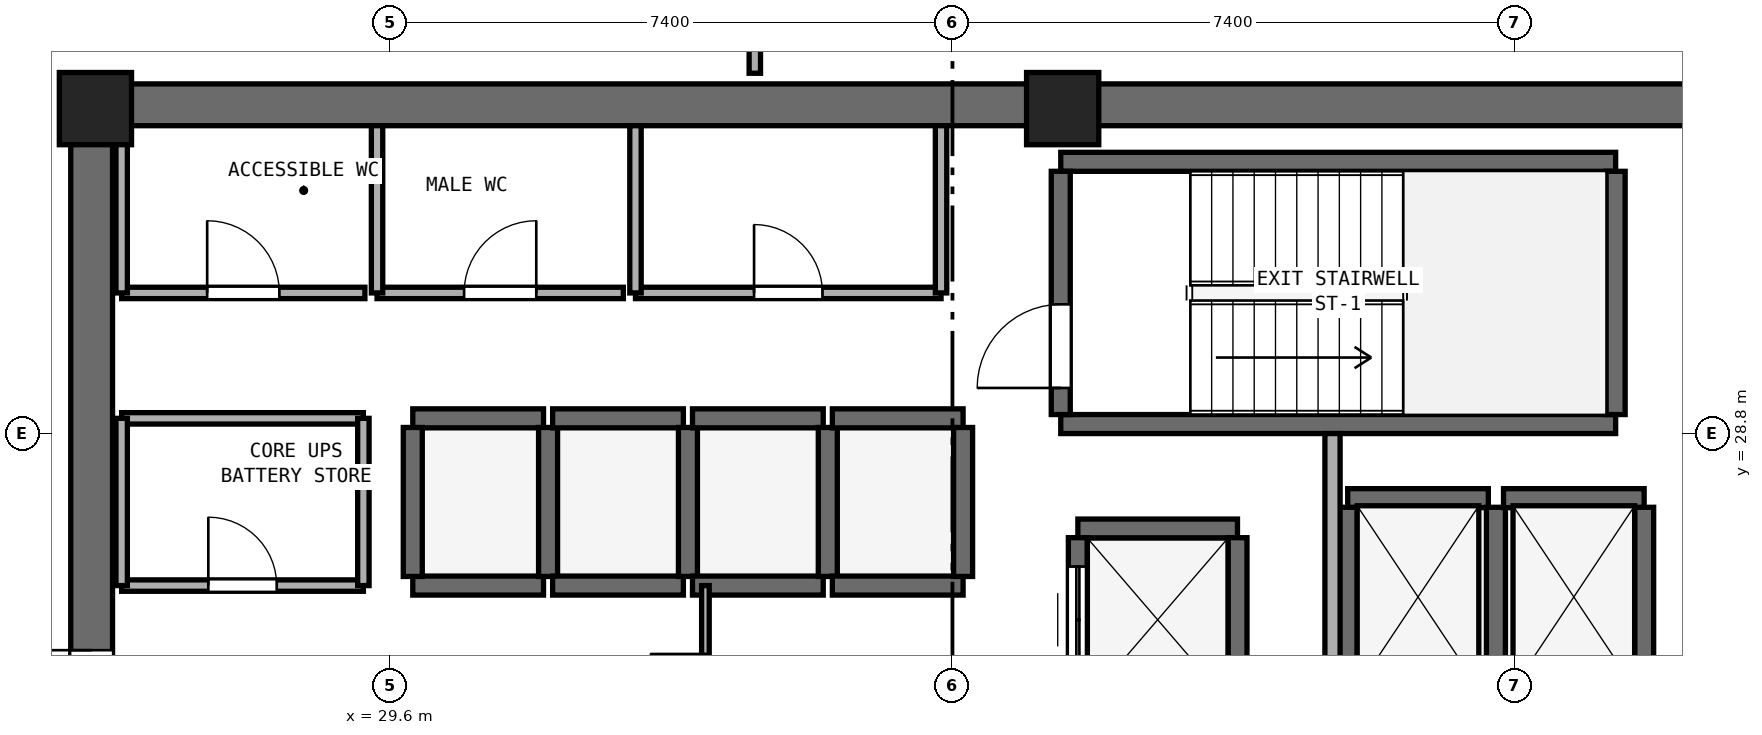
"""IFC4 building model, lengths in metres.
Left out: names, types, materials, properties, quantities, classifications, styles, units other than length and angle.
Written with IfcOpenShell. Run it as: python <this file> out.ifc"""

import sys

from ifc_helpers import new_model, si_unit, direction, frame, frame_2d, origin, origin_2d, place, context, subcontext, project, spatial, rectangle, extrude, element, fill, save


model = new_model("IFC4")
c1 = context("Model", 3, precision=1e-05, world=origin(), true_north=direction((0.0, 1.0)))
c2 = subcontext(c1, "Body", "Model", "MODEL_VIEW")
j1 = project(units=[si_unit("LENGTHUNIT", "METRE"), si_unit("PLANEANGLEUNIT", "RADIAN")], contexts=[c1])
p1 = place(None, origin())
s1 = spatial("IfcSite", under=j1, at=p1, CompositionType="ELEMENT")
p2 = place(p1, origin())
s2 = spatial("IfcBuilding", under=s1, at=p2, CompositionType="ELEMENT")
p3 = place(p2, frame((0.0, 0.0, 197.2)))
s3 = spatial("IfcBuildingStorey", under=s2, at=p3, CompositionType="ELEMENT", Elevation=197.2)
p4 = place(p3, frame((25.4, 33.125, 0.0), z_axis=(0.0, 0.0, 1.0), x_axis=(1.0, 0.0, 0.0)))
e1 = element("IfcWall", 1, at=p4, inside=s3, PredefinedType="SHEAR", context=c2, shape_type="SweptSolid", body=[
    extrude(rectangle(XDim=23.2, YDim=0.55, at=frame_2d((11.6, 0.0))), origin(), (0.0, 0.0, 1.0), 3.54),
])
p5 = place(p3, frame((25.675, 17.55, 0.0), z_axis=(0.0, 0.0, 1.0), x_axis=(0.0, 1.0, 0.0)))
e2 = element("IfcWall", 2, at=p5, inside=s3, PredefinedType="SHEAR", context=c2, shape_type="SweptSolid", body=[
    extrude(rectangle(XDim=15.3, YDim=0.55, at=frame_2d((7.65, 0.0))), origin(), (0.0, 0.0, 1.0), 3.54),
])
p6 = place(p5, frame((6.9, 0.0, 0.0)))
e3 = element("IfcOpeningElement", 3, at=p6, cuts=e2, PredefinedType="OPENING", context=c2, shape_type="SweptSolid", body=[
    extrude(rectangle(XDim=1.5, YDim=2.15, at=frame_2d((0.75, 1.075))), frame((0.0, 0.285, 0.0), z_axis=(0.0, -1.0, 0.0), x_axis=(1.0, 0.0, 0.0)), (0.0, 0.0, 1.0), 0.57),
])
for number, where, z_axis, x_axis in (
    (4, (38.45, 33.075, 0.0), (0.0, 0.0, 1.0), (1.0, 0.0, 0.0)),
    (5, (25.725, 33.075, 0.0), (0.0, 0.0, 1.0), (1.0, 0.0, 0.0)),
):
    element("IfcColumn", number, at=place(p3, frame(where, z_axis=z_axis, x_axis=x_axis)), inside=s3, PredefinedType="PILASTER", context=c2, shape_type="SweptSolid", body=[
        extrude(rectangle(XDim=0.95, YDim=0.95, at=origin_2d()), origin(), (0.0, 0.0, 1.0), 3.8),
    ])
for number, where, z_axis, x_axis in (
    (6, (38.425, 28.925, 0.0), (0.0, 0.0, 1.0), (1.0, 0.0, 0.0)),
    (7, (38.425, 32.375, 0.0), (0.0, 0.0, 1.0), (1.0, 0.0, 0.0)),
):
    element("IfcWall", number, at=place(p3, frame(where, z_axis=z_axis, x_axis=x_axis)), inside=s3, PredefinedType="SHEAR", context=c2, shape_type="SweptSolid", body=[
        extrude(rectangle(XDim=7.3, YDim=0.25, at=frame_2d((3.65, 0.0))), origin(), (0.0, 0.0, 1.0), 3.54),
    ])
p7 = place(p3, frame((38.425, 29.05, 0.0), z_axis=(0.0, 0.0, 1.0), x_axis=(0.0, 1.0, 0.0)))
e8 = element("IfcWall", 8, at=p7, inside=s3, PredefinedType="SHEAR", context=c2, shape_type="SweptSolid", body=[
    extrude(rectangle(XDim=3.2, YDim=0.25, at=frame_2d((1.6, 0.0))), origin(), (0.0, 0.0, 1.0), 3.54),
])
p8 = place(p7, frame((0.35, 0.0, 0.0)))
e9 = element("IfcOpeningElement", 9, at=p8, cuts=e8, PredefinedType="OPENING", context=c2, shape_type="SweptSolid", body=[
    extrude(rectangle(XDim=1.1, YDim=2.15, at=frame_2d((0.55, 1.075))), frame((0.0, 0.135, 0.0), z_axis=(0.0, -1.0, 0.0), x_axis=(1.0, 0.0, 0.0)), (0.0, 0.0, 1.0), 0.27),
])
p9 = place(p3, frame((45.725, 29.05, 0.0), z_axis=(0.0, 0.0, 1.0), x_axis=(0.0, 1.0, 0.0)))
e10 = element("IfcWall", 10, at=p9, inside=s3, PredefinedType="SHEAR", context=c2, shape_type="SweptSolid", body=[
    extrude(rectangle(XDim=3.2, YDim=0.25, at=frame_2d((1.6, 0.0))), origin(), (0.0, 0.0, 1.0), 3.54),
])
for number, where, z_axis, x_axis in (
    (11, (29.9, 26.8, 0.0), (0.0, 0.0, 1.0), (1.0, 0.0, 0.0)),
    (12, (29.9, 29.0, 0.0), (0.0, 0.0, 1.0), (1.0, 0.0, 0.0)),
):
    element("IfcWall", number, at=place(p3, frame(where, z_axis=z_axis, x_axis=x_axis)), inside=s3, PredefinedType="SHEAR", context=c2, shape_type="SweptSolid", body=[
        extrude(rectangle(XDim=1.72, YDim=0.25, at=frame_2d((0.86, 0.0))), origin(), (0.0, 0.0, 1.0), 3.54),
    ])
for number, where, z_axis, x_axis in (
    (13, (29.9, 26.92, 0.0), (0.0, 0.0, 1.0), (0.0, 1.0, 0.0)),
    (14, (31.68, 26.92, 0.0), (0.0, 0.0, 1.0), (0.0, 1.0, 0.0)),
):
    element("IfcWall", number, at=place(p3, frame(where, z_axis=z_axis, x_axis=x_axis)), inside=s3, PredefinedType="SHEAR", context=c2, shape_type="SweptSolid", body=[
        extrude(rectangle(XDim=1.96, YDim=0.25, at=frame_2d((0.98, 0.0))), origin(), (0.0, 0.0, 1.0), 3.54),
    ])
for number, where, z_axis, x_axis in (
    (15, (31.74, 26.8, 0.0), (0.0, 0.0, 1.0), (1.0, 0.0, 0.0)),
    (16, (31.74, 29.0, 0.0), (0.0, 0.0, 1.0), (1.0, 0.0, 0.0)),
):
    element("IfcWall", number, at=place(p3, frame(where, z_axis=z_axis, x_axis=x_axis)), inside=s3, PredefinedType="SHEAR", context=c2, shape_type="SweptSolid", body=[
        extrude(rectangle(XDim=1.72, YDim=0.25, at=frame_2d((0.86, 0.0))), origin(), (0.0, 0.0, 1.0), 3.54),
    ])
p10 = place(p3, frame((33.52, 26.92, 0.0), z_axis=(0.0, 0.0, 1.0), x_axis=(0.0, 1.0, 0.0)))
e17 = element("IfcWall", 17, at=p10, inside=s3, PredefinedType="SHEAR", context=c2, shape_type="SweptSolid", body=[
    extrude(rectangle(XDim=1.96, YDim=0.25, at=frame_2d((0.98, 0.0))), origin(), (0.0, 0.0, 1.0), 3.54),
])
for number, where, z_axis, x_axis in (
    (18, (33.58, 26.8, 0.0), (0.0, 0.0, 1.0), (1.0, 0.0, 0.0)),
    (19, (33.58, 29.0, 0.0), (0.0, 0.0, 1.0), (1.0, 0.0, 0.0)),
):
    element("IfcWall", number, at=place(p3, frame(where, z_axis=z_axis, x_axis=x_axis)), inside=s3, PredefinedType="SHEAR", context=c2, shape_type="SweptSolid", body=[
        extrude(rectangle(XDim=1.72, YDim=0.25, at=frame_2d((0.86, 0.0))), origin(), (0.0, 0.0, 1.0), 3.54),
    ])
p11 = place(p3, frame((35.36, 26.92, 0.0), z_axis=(0.0, 0.0, 1.0), x_axis=(0.0, 1.0, 0.0)))
e20 = element("IfcWall", 20, at=p11, inside=s3, PredefinedType="SHEAR", context=c2, shape_type="SweptSolid", body=[
    extrude(rectangle(XDim=1.96, YDim=0.25, at=frame_2d((0.98, 0.0))), origin(), (0.0, 0.0, 1.0), 3.54),
])
for number, where, z_axis, x_axis in (
    (21, (35.42, 26.8, 0.0), (0.0, 0.0, 1.0), (1.0, 0.0, 0.0)),
    (22, (35.42, 29.0, 0.0), (0.0, 0.0, 1.0), (1.0, 0.0, 0.0)),
):
    element("IfcWall", number, at=place(p3, frame(where, z_axis=z_axis, x_axis=x_axis)), inside=s3, PredefinedType="SHEAR", context=c2, shape_type="SweptSolid", body=[
        extrude(rectangle(XDim=1.72, YDim=0.25, at=frame_2d((0.86, 0.0))), origin(), (0.0, 0.0, 1.0), 3.54),
    ])
p12 = place(p3, frame((37.14, 26.92, 0.0), z_axis=(0.0, 0.0, 1.0), x_axis=(0.0, 1.0, 0.0)))
e23 = element("IfcWall", 23, at=p12, inside=s3, PredefinedType="SHEAR", context=c2, shape_type="SweptSolid", body=[
    extrude(rectangle(XDim=1.96, YDim=0.25, at=frame_2d((0.98, 0.0))), origin(), (0.0, 0.0, 1.0), 3.54),
])
p13 = place(p3, frame((42.2, 27.95, 0.0), z_axis=(0.0, 0.0, 1.0), x_axis=(1.0, 0.0, 0.0)))
e24 = element("IfcWall", 24, at=p13, inside=s3, PredefinedType="SHEAR", context=c2, shape_type="SweptSolid", body=[
    extrude(rectangle(XDim=1.85, YDim=0.25, at=frame_2d((0.925, 0.0))), origin(), (0.0, 0.0, 1.0), 3.54),
])
for number, where, z_axis, x_axis in (
    (25, (42.2, 25.47, 0.0), (0.0, 0.0, 1.0), (0.0, 1.0, 0.0)),
    (26, (44.15, 25.47, 0.0), (0.0, 0.0, 1.0), (0.0, 1.0, 0.0)),
):
    element("IfcWall", number, at=place(p3, frame(where, z_axis=z_axis, x_axis=x_axis)), inside=s3, PredefinedType="SHEAR", context=c2, shape_type="SweptSolid", body=[
        extrude(rectangle(XDim=2.36, YDim=0.25, at=frame_2d((1.18, 0.0))), origin(), (0.0, 0.0, 1.0), 3.54),
    ])
p14 = place(p3, frame((44.25, 27.95, 0.0), z_axis=(0.0, 0.0, 1.0), x_axis=(1.0, 0.0, 0.0)))
e27 = element("IfcWall", 27, at=p14, inside=s3, PredefinedType="SHEAR", context=c2, shape_type="SweptSolid", body=[
    extrude(rectangle(XDim=1.85, YDim=0.25, at=frame_2d((0.925, 0.0))), origin(), (0.0, 0.0, 1.0), 3.54),
])
p15 = place(p3, frame((46.1, 25.47, 0.0), z_axis=(0.0, 0.0, 1.0), x_axis=(0.0, 1.0, 0.0)))
e28 = element("IfcWall", 28, at=p15, inside=s3, PredefinedType="SHEAR", context=c2, shape_type="SweptSolid", body=[
    extrude(rectangle(XDim=2.36, YDim=0.25, at=frame_2d((1.18, 0.0))), origin(), (0.0, 0.0, 1.0), 3.54),
])
p16 = place(p3, frame((38.65, 27.55, 0.0), z_axis=(0.0, 0.0, 1.0), x_axis=(1.0, 0.0, 0.0)))
e29 = element("IfcWall", 29, at=p16, inside=s3, PredefinedType="SHEAR", context=c2, shape_type="SweptSolid", body=[
    extrude(rectangle(XDim=2.1, YDim=0.25, at=frame_2d((1.05, 0.0))), origin(), (0.0, 0.0, 1.0), 3.54),
])
p17 = place(p3, frame((38.65, 25.27, 0.0), z_axis=(0.0, 0.0, 1.0), x_axis=(0.0, 1.0, 0.0)))
e30 = element("IfcWall", 30, at=p17, inside=s3, PredefinedType="SHEAR", context=c2, shape_type="SweptSolid", body=[
    extrude(rectangle(XDim=2.16, YDim=0.25, at=frame_2d((1.08, 0.0))), origin(), (0.0, 0.0, 1.0), 3.54),
])
p18 = place(p17, frame((0.38, 0.0, 0.0)))
e31 = element("IfcOpeningElement", 31, at=p18, cuts=e30, PredefinedType="OPENING", context=c2, shape_type="SweptSolid", body=[
    extrude(rectangle(XDim=1.4, YDim=2.2, at=frame_2d((0.7, 1.1))), frame((0.0, 0.135, 0.0), z_axis=(0.0, -1.0, 0.0), x_axis=(1.0, 0.0, 0.0)), (0.0, 0.0, 1.0), 0.27),
])
p19 = place(p3, frame((40.75, 25.27, 0.0), z_axis=(0.0, 0.0, 1.0), x_axis=(0.0, 1.0, 0.0)))
e32 = element("IfcWall", 32, at=p19, inside=s3, PredefinedType="SHEAR", context=c2, shape_type="SweptSolid", body=[
    extrude(rectangle(XDim=2.16, YDim=0.25, at=frame_2d((1.08, 0.0))), origin(), (0.0, 0.0, 1.0), 3.54),
])
p20 = place(p3, frame((42.0, 22.75, 0.0), z_axis=(0.0, 0.0, 1.0), x_axis=(0.0, 1.0, 0.0)))
e33 = element("IfcWall", 33, at=p20, inside=s3, PredefinedType="SOLIDWALL", context=c2, shape_type="SweptSolid", body=[
    extrude(rectangle(XDim=6.05, YDim=0.2, at=frame_2d((3.025, 0.0))), origin(), (0.0, 0.0, 1.0), 3.54),
])
p21 = place(p20, frame((0.65, 0.0, 0.0)))
e34 = element("IfcOpeningElement", 34, at=p21, cuts=e33, PredefinedType="OPENING", context=c2, shape_type="SweptSolid", body=[
    extrude(rectangle(XDim=1.2, YDim=2.15, at=frame_2d((0.6, 1.075))), frame((0.0, 0.11, 0.0), z_axis=(0.0, -1.0, 0.0), x_axis=(1.0, 0.0, 0.0)), (0.0, 0.0, 1.0), 0.22),
])
p22 = place(p3, frame((26.07, 30.65, 0.0), z_axis=(0.0, 0.0, 1.0), x_axis=(1.0, 0.0, 0.0)))
e35 = element("IfcWall", 35, at=p22, inside=s3, PredefinedType="PARTITIONING", context=c2, shape_type="SweptSolid", body=[
    extrude(rectangle(XDim=3.2, YDim=0.15, at=frame_2d((1.6, 0.0))), origin(), (0.0, 0.0, 1.0), 3.54),
])
p23 = place(p22, frame((1.125, 0.0, 0.0)))
e36 = element("IfcOpeningElement", 36, at=p23, cuts=e35, PredefinedType="OPENING", context=c2, shape_type="SweptSolid", body=[
    extrude(rectangle(XDim=0.95, YDim=2.1, at=frame_2d((0.475, 1.05))), frame((0.0, 0.085, 0.0), z_axis=(0.0, -1.0, 0.0), x_axis=(1.0, 0.0, 0.0)), (0.0, 0.0, 1.0), 0.17),
])
p24 = place(p3, frame((26.07, 30.65, 0.0), z_axis=(0.0, 0.0, 1.0), x_axis=(0.0, 1.0, 0.0)))
e37 = element("IfcWall", 37, at=p24, inside=s3, PredefinedType="PARTITIONING", context=c2, shape_type="SweptSolid", body=[
    extrude(rectangle(XDim=2.2, YDim=0.15, at=frame_2d((1.1, 0.0))), origin(), (0.0, 0.0, 1.0), 2.64),
])
p25 = place(p3, frame((29.43, 30.65, 0.0), z_axis=(0.0, 0.0, 1.0), x_axis=(1.0, 0.0, 0.0)))
e38 = element("IfcWall", 38, at=p25, inside=s3, PredefinedType="PARTITIONING", context=c2, shape_type="SweptSolid", body=[
    extrude(rectangle(XDim=3.24, YDim=0.15, at=frame_2d((1.62, 0.0))), origin(), (0.0, 0.0, 1.0), 3.54),
])
p26 = place(p25, frame((1.145, 0.0, 0.0)))
e39 = element("IfcOpeningElement", 39, at=p26, cuts=e38, PredefinedType="OPENING", context=c2, shape_type="SweptSolid", body=[
    extrude(rectangle(XDim=0.95, YDim=2.1, at=frame_2d((0.475, 1.05))), frame((0.0, 0.085, 0.0), z_axis=(0.0, -1.0, 0.0), x_axis=(1.0, 0.0, 0.0)), (0.0, 0.0, 1.0), 0.17),
])
p27 = place(p3, frame((29.43, 30.65, 0.0), z_axis=(0.0, 0.0, 1.0), x_axis=(0.0, 1.0, 0.0)))
e40 = element("IfcWall", 40, at=p27, inside=s3, PredefinedType="PARTITIONING", context=c2, shape_type="SweptSolid", body=[
    extrude(rectangle(XDim=2.2, YDim=0.15, at=frame_2d((1.1, 0.0))), origin(), (0.0, 0.0, 1.0), 3.54),
])
p28 = place(p3, frame((32.83, 30.65, 0.0), z_axis=(0.0, 0.0, 1.0), x_axis=(1.0, 0.0, 0.0)))
e41 = element("IfcWall", 41, at=p28, inside=s3, PredefinedType="PARTITIONING", context=c2, shape_type="SweptSolid", body=[
    extrude(rectangle(XDim=4.02, YDim=0.15, at=frame_2d((2.01, 0.0))), origin(), (0.0, 0.0, 1.0), 3.54),
])
p29 = place(p28, frame((1.56, 0.0, 0.0)))
e42 = element("IfcOpeningElement", 42, at=p29, cuts=e41, PredefinedType="OPENING", context=c2, shape_type="SweptSolid", body=[
    extrude(rectangle(XDim=0.9, YDim=2.1, at=frame_2d((0.45, 1.05))), frame((0.0, 0.085, 0.0), z_axis=(0.0, -1.0, 0.0), x_axis=(1.0, 0.0, 0.0)), (0.0, 0.0, 1.0), 0.17),
])
for number, where, z_axis, x_axis in (
    (43, (32.83, 30.65, 0.0), (0.0, 0.0, 1.0), (0.0, 1.0, 0.0)),
    (44, (36.85, 30.65, 0.0), (0.0, 0.0, 1.0), (0.0, 1.0, 0.0)),
):
    element("IfcWall", number, at=place(p3, frame(where, z_axis=z_axis, x_axis=x_axis)), inside=s3, PredefinedType="PARTITIONING", context=c2, shape_type="SweptSolid", body=[
        extrude(rectangle(XDim=2.2, YDim=0.15, at=frame_2d((1.1, 0.0))), origin(), (0.0, 0.0, 1.0), 3.54),
    ])
p30 = place(p3, frame((26.07, 26.8, 0.0), z_axis=(0.0, 0.0, 1.0), x_axis=(1.0, 0.0, 0.0)))
e45 = element("IfcWall", 45, at=p30, inside=s3, PredefinedType="PARTITIONING", context=c2, shape_type="SweptSolid", body=[
    extrude(rectangle(XDim=3.18, YDim=0.15, at=frame_2d((1.59, 0.0))), origin(), (0.0, 0.0, 1.0), 3.54),
])
p31 = place(p30, frame((1.14, 0.0, 0.0)))
e46 = element("IfcOpeningElement", 46, at=p31, cuts=e45, PredefinedType="OPENING", context=c2, shape_type="SweptSolid", body=[
    extrude(rectangle(XDim=0.9, YDim=2.1, at=frame_2d((0.45, 1.05))), frame((0.0, 0.085, 0.0), z_axis=(0.0, -1.0, 0.0), x_axis=(1.0, 0.0, 0.0)), (0.0, 0.0, 1.0), 0.17),
])
p32 = place(p3, frame((26.07, 29.0, 0.0), z_axis=(0.0, 0.0, 1.0), x_axis=(1.0, 0.0, 0.0)))
e47 = element("IfcWall", 47, at=p32, inside=s3, PredefinedType="PARTITIONING", context=c2, shape_type="SweptSolid", body=[
    extrude(rectangle(XDim=3.18, YDim=0.15, at=frame_2d((1.59, 0.0))), origin(), (0.0, 0.0, 1.0), 3.54),
])
p33 = place(p3, frame((26.07, 26.8, 0.0), z_axis=(0.0, 0.0, 1.0), x_axis=(0.0, 1.0, 0.0)))
e48 = element("IfcWall", 48, at=p33, inside=s3, PredefinedType="PARTITIONING", context=c2, shape_type="SweptSolid", body=[
    extrude(rectangle(XDim=2.2, YDim=0.15, at=frame_2d((1.1, 0.0))), origin(), (0.0, 0.0, 1.0), 2.64),
])
p34 = place(p3, frame((29.25, 26.8, 0.0), z_axis=(0.0, 0.0, 1.0), x_axis=(0.0, 1.0, 0.0)))
e49 = element("IfcWall", 49, at=p34, inside=s3, PredefinedType="PARTITIONING", context=c2, shape_type="SweptSolid", body=[
    extrude(rectangle(XDim=2.2, YDim=0.15, at=frame_2d((1.1, 0.0))), origin(), (0.0, 0.0, 1.0), 3.54),
])
p35 = place(p3, frame((33.75, 23.6, 0.0), z_axis=(0.0, 0.0, 1.0), x_axis=(0.0, 1.0, 0.0)))
e50 = element("IfcWall", 50, at=p35, inside=s3, PredefinedType="PARTITIONING", context=c2, shape_type="SweptSolid", body=[
    extrude(rectangle(XDim=3.2, YDim=0.1, at=frame_2d((1.6, 0.0))), origin(), (0.0, 0.0, 1.0), 3.54),
])
p36 = place(p35, frame((0.85, 0.0, 0.0)))
e51 = element("IfcOpeningElement", 51, at=p36, cuts=e50, PredefinedType="OPENING", context=c2, shape_type="SweptSolid", body=[
    extrude(rectangle(XDim=1.45, YDim=2.12, at=frame_2d((0.725, 1.06))), frame((0.0, 0.06, 0.0), z_axis=(0.0, -1.0, 0.0), x_axis=(1.0, 0.0, 0.0)), (0.0, 0.0, 1.0), 0.12),
])
p37 = place(p3, frame((34.4, 33.54, 0.0), z_axis=(0.0, 0.0, 1.0), x_axis=(0.0, 1.0, 0.0)))
e52 = element("IfcWall", 52, at=p37, inside=s3, PredefinedType="PARTITIONING", context=c2, shape_type="SweptSolid", body=[
    extrude(rectangle(XDim=1.81, YDim=0.15, at=frame_2d((0.905, 0.0))), origin(), (0.0, 0.0, 1.0), 3.54),
])
p38 = place(p8, origin())
e53 = element("IfcDoor", 53, at=p38, inside=s3, OperationType="SINGLE_SWING_LEFT", PredefinedType="DOOR", context=c2, shape_type="SweptSolid", body=[
    extrude(rectangle(XDim=1.1, YDim=2.15, at=frame_2d((0.55, 1.075))), frame((0.0, 0.025, 0.0), z_axis=(0.0, -1.0, 0.0), x_axis=(1.0, 0.0, 0.0)), (0.0, 0.0, 1.0), 0.05),
])
fill(e9, e53)
p39 = place(p18, origin())
e54 = element("IfcDoor", 54, at=p39, inside=s3, OperationType="DOUBLE_DOOR_SLIDING", PredefinedType="DOOR", context=c2, shape_type="SweptSolid", body=[
    extrude(rectangle(XDim=1.4, YDim=2.2, at=frame_2d((0.7, 1.1))), frame((0.0, 0.025, 0.0), z_axis=(0.0, -1.0, 0.0), x_axis=(1.0, 0.0, 0.0)), (0.0, 0.0, 1.0), 0.05),
])
fill(e31, e54)
p40 = place(p6, origin())
e55 = element("IfcDoor", 55, at=p40, inside=s3, OperationType="DOUBLE_DOOR_SINGLE_SWING", PredefinedType="DOOR", context=c2, shape_type="SweptSolid", body=[
    extrude(rectangle(XDim=1.5, YDim=2.15, at=frame_2d((0.75, 1.075))), frame((0.0, 0.025, 0.0), z_axis=(0.0, -1.0, 0.0), x_axis=(1.0, 0.0, 0.0)), (0.0, 0.0, 1.0), 0.05),
])
fill(e3, e55)
p41 = place(p23, origin())
e56 = element("IfcDoor", 56, at=p41, inside=s3, OperationType="SINGLE_SWING_LEFT", PredefinedType="DOOR", context=c2, shape_type="SweptSolid", body=[
    extrude(rectangle(XDim=0.95, YDim=2.1, at=frame_2d((0.475, 1.05))), frame((0.0, 0.025, 0.0), z_axis=(0.0, -1.0, 0.0), x_axis=(1.0, 0.0, 0.0)), (0.0, 0.0, 1.0), 0.05),
])
fill(e36, e56)
p42 = place(p26, origin())
e57 = element("IfcDoor", 57, at=p42, inside=s3, OperationType="SINGLE_SWING_RIGHT", PredefinedType="DOOR", context=c2, shape_type="SweptSolid", body=[
    extrude(rectangle(XDim=0.95, YDim=2.1, at=frame_2d((0.475, 1.05))), frame((0.0, 0.025, 0.0), z_axis=(0.0, -1.0, 0.0), x_axis=(1.0, 0.0, 0.0)), (0.0, 0.0, 1.0), 0.05),
])
fill(e39, e57)
p43 = place(p29, origin())
e58 = element("IfcDoor", 58, at=p43, inside=s3, OperationType="SINGLE_SWING_LEFT", PredefinedType="DOOR", context=c2, shape_type="SweptSolid", body=[
    extrude(rectangle(XDim=0.9, YDim=2.1, at=frame_2d((0.45, 1.05))), frame((0.0, 0.025, 0.0), z_axis=(0.0, -1.0, 0.0), x_axis=(1.0, 0.0, 0.0)), (0.0, 0.0, 1.0), 0.05),
])
fill(e42, e58)
p44 = place(p31, origin())
e59 = element("IfcDoor", 59, at=p44, inside=s3, OperationType="SINGLE_SWING_LEFT", PredefinedType="DOOR", context=c2, shape_type="SweptSolid", body=[
    extrude(rectangle(XDim=0.9, YDim=2.1, at=frame_2d((0.45, 1.05))), frame((0.0, 0.025, 0.0), z_axis=(0.0, -1.0, 0.0), x_axis=(1.0, 0.0, 0.0)), (0.0, 0.0, 1.0), 0.05),
])
fill(e46, e59)
p45 = place(p36, origin())
e60 = element("IfcDoor", 60, at=p45, inside=s3, OperationType="DOUBLE_DOOR_SINGLE_SWING", PredefinedType="DOOR", context=c2, shape_type="SweptSolid", body=[
    extrude(rectangle(XDim=1.45, YDim=2.12, at=frame_2d((0.725, 1.06))), frame((0.0, 0.025, 0.0), z_axis=(0.0, -1.0, 0.0), x_axis=(1.0, 0.0, 0.0)), (0.0, 0.0, 1.0), 0.05),
])
fill(e51, e60)
save(model, sys.argv[1])
